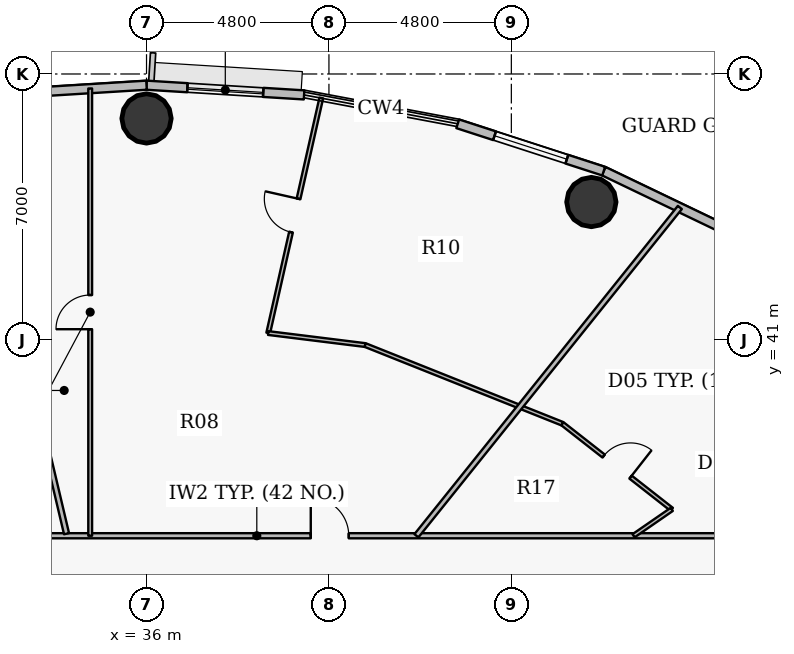
"""IFC4 building model, lengths in metres.
Left out: names, types, materials, properties, quantities, classifications, styles, units other than length and angle.
Written with IfcOpenShell. Run it as: python <this file> out.ifc"""

import sys

from ifc_helpers import new_model, si_unit, direction, frame, frame_2d, origin, origin_2d, place, context, subcontext, project, spatial, rectangle, hollow_circle, extrude, source, transform, mapped, element, fill, save


model = new_model("IFC4")
c1 = context("Model", 3, precision=1e-05, world=origin(), true_north=direction((0.0, 1.0)))
c2 = subcontext(c1, "Body", "Model", "MODEL_VIEW")
j1 = project(units=[si_unit("LENGTHUNIT", "METRE"), si_unit("PLANEANGLEUNIT", "RADIAN")], contexts=[c1])
p1 = place(None, origin())
s1 = spatial("IfcSite", under=j1, at=p1, CompositionType="ELEMENT")
p2 = place(p1, origin())
s2 = spatial("IfcBuilding", under=s1, at=p2, CompositionType="ELEMENT")
p3 = place(p2, frame((0.0, 0.0, 163.65)))
s3 = spatial("IfcBuildingStorey", under=s2, at=p3, CompositionType="ELEMENT", Elevation=163.65)
for number, where, z_axis, x_axis in (
    (1, (47.706, 44.631, 0.0), (0.0, 0.0, 1.0), (1.0, 0.0, 0.0)),
    (2, (36.0, 46.83, 0.0), (0.0, 0.0, 1.0), (1.0, 0.0, 0.0)),
):
    element("IfcColumn", number, at=place(p3, frame(where, z_axis=z_axis, x_axis=x_axis)), inside=s3, PredefinedType="COLUMN", context=c2, shape_type="SweptSolid", body=[
        extrude(hollow_circle(Radius=0.65, WallThickness=0.04, at=origin_2d()), origin(), (0.0, 0.0, 1.0), 3.75),
    ])
p4 = place(p3, frame((48.03, 45.444, 0.0), z_axis=(0.0, 0.0, 1.0), x_axis=(0.901564733809, -0.432644231155, 0.0)))
e3 = element("IfcWall", 3, at=p4, inside=s3, PredefinedType="SOLIDWALL", context=c2, shape_type="SweptSolid", body=[
    extrude(rectangle(XDim=3.93, YDim=0.24, at=frame_2d((1.965, 0.0))), origin(), (0.0, 0.0, 1.0), 3.5),
])
p5 = place(p3, frame((44.189, 46.689, 0.0), z_axis=(0.0, 0.0, 1.0), x_axis=(0.951209870236, -0.30854462038, 0.0)))
e4 = element("IfcWall", 4, at=p5, inside=s3, PredefinedType="SOLIDWALL", context=c2, shape_type="SweptSolid", body=[
    extrude(rectangle(XDim=4.038, YDim=0.24, at=frame_2d((2.019, 0.0))), origin(), (0.0, 0.0, 1.0), 3.5),
])
p6 = place(p5, frame((1.019, 0.0, 0.9)))
e5 = element("IfcOpeningElement", 5, at=p6, cuts=e4, PredefinedType="OPENING", context=c2, shape_type="SweptSolid", body=[
    extrude(rectangle(XDim=2.0, YDim=1.75, at=origin_2d()), frame((1.0, 0.13, 0.875), z_axis=(0.0, -1.0, 0.0), x_axis=(1.0, 0.0, 0.0)), (0.0, 0.0, 1.0), 0.26),
])
p7 = place(p3, frame((36.0, 47.705, 0.0), z_axis=(0.0, 0.0, 1.0), x_axis=(0.998104600619, -0.061540281305, 0.0)))
e6 = element("IfcWall", 6, at=p7, inside=s3, PredefinedType="SOLIDWALL", context=c2, shape_type="SweptSolid", body=[
    extrude(rectangle(XDim=4.154, YDim=0.24, at=frame_2d((2.077, 0.0))), origin(), (0.0, 0.0, 1.0), 3.5),
])
p8 = place(p7, frame((1.077, 0.0, 0.9)))
e7 = element("IfcOpeningElement", 7, at=p8, cuts=e6, PredefinedType="OPENING", context=c2, shape_type="SweptSolid", body=[
    extrude(rectangle(XDim=2.0, YDim=1.75, at=origin_2d()), frame((1.0, 0.13, 0.875), z_axis=(0.0, -1.0, 0.0), x_axis=(1.0, 0.0, 0.0)), (0.0, 0.0, 1.0), 0.26),
])
p9 = place(p3, frame((31.854, 47.449, 0.0), z_axis=(0.0, 0.0, 1.0), x_axis=(0.998104600619, 0.061540281305, 0.0)))
e8 = element("IfcWall", 8, at=p9, inside=s3, PredefinedType="SOLIDWALL", context=c2, shape_type="SweptSolid", body=[
    extrude(rectangle(XDim=4.154, YDim=0.24, at=frame_2d((2.077, 0.0))), origin(), (0.0, 0.0, 1.0), 3.5),
])
p10 = place(p3, frame((24.35, 35.85, 0.0), z_axis=(0.0, 0.0, 1.0), x_axis=(1.0, 0.0, 0.0)))
e9 = element("IfcWall", 9, at=p10, inside=s3, PredefinedType="PARTITIONING", context=c2, shape_type="SweptSolid", body=[
    extrude(rectangle(XDim=29.104, YDim=0.135, at=frame_2d((14.552, 0.0))), origin(), (0.0, 0.0, 1.0), 2.935),
])
p11 = place(p10, frame((15.972, 0.0, 0.0)))
e10 = element("IfcOpeningElement", 10, at=p11, cuts=e9, PredefinedType="OPENING", context=c2, shape_type="SweptSolid", body=[
    extrude(rectangle(XDim=1.0, YDim=2.15, at=origin_2d()), frame((0.5, 0.078, 1.075), z_axis=(0.0, -1.0, 0.0), x_axis=(1.0, 0.0, 0.0)), (0.0, 0.0, 1.0), 0.155),
])
p12 = place(p10, frame((4.074, 0.0, 0.0)))
e11 = element("IfcOpeningElement", 11, at=p12, cuts=e9, PredefinedType="OPENING", context=c2, shape_type="SweptSolid", body=[
    extrude(rectangle(XDim=1.0, YDim=2.15, at=origin_2d()), frame((0.5, 0.078, 1.075), z_axis=(0.0, -1.0, 0.0), x_axis=(1.0, 0.0, 0.0)), (0.0, 0.0, 1.0), 0.155),
])
p13 = place(p3, frame((32.976, 39.792, 0.0), z_axis=(0.0, 0.0, 1.0), x_axis=(0.230050705958, -0.973178643769, 0.0)))
e12 = element("IfcWall", 12, at=p13, inside=s3, PredefinedType="PARTITIONING", context=c2, shape_type="SweptSolid", body=[
    extrude(rectangle(XDim=3.996, YDim=0.135, at=frame_2d((1.998, 0.0))), origin(), (0.0, 0.0, 1.0), 3.5),
])
p14 = place(p3, frame((34.518, 35.85, 0.0), z_axis=(0.0, 0.0, 1.0), x_axis=(0.0, 1.0, 0.0)))
e13 = element("IfcWall", 13, at=p14, inside=s3, PredefinedType="PARTITIONING", context=c2, shape_type="SweptSolid", body=[
    extrude(rectangle(XDim=11.769, YDim=0.1, at=frame_2d((5.884, 0.0))), origin(), (0.0, 0.0, 1.0), 2.935),
])
p15 = place(p14, frame((5.434, 0.0, 0.0)))
e14 = element("IfcOpeningElement", 14, at=p15, cuts=e13, PredefinedType="OPENING", context=c2, shape_type="SweptSolid", body=[
    extrude(rectangle(XDim=0.9, YDim=2.1, at=origin_2d()), frame((0.45, 0.06, 1.05), z_axis=(0.0, -1.0, 0.0), x_axis=(1.0, 0.0, 0.0)), (0.0, 0.0, 1.0), 0.12),
])
p16 = place(p3, frame((39.202, 41.184, 0.0), z_axis=(0.0, 0.0, 1.0), x_axis=(0.220223056883, 0.975449540067, 0.0)))
e15 = element("IfcWall", 15, at=p16, inside=s3, PredefinedType="PARTITIONING", context=c2, shape_type="SweptSolid", body=[
    extrude(rectangle(XDim=6.341, YDim=0.1, at=frame_2d((3.171, 0.0))), origin(), (0.0, 0.0, 1.0), 2.935),
])
p17 = place(p16, frame((2.721, 0.0, 0.0)))
e16 = element("IfcOpeningElement", 16, at=p17, cuts=e15, PredefinedType="OPENING", context=c2, shape_type="SweptSolid", body=[
    extrude(rectangle(XDim=0.9, YDim=2.1, at=origin_2d()), frame((0.45, 0.06, 1.05), z_axis=(0.0, -1.0, 0.0), x_axis=(1.0, 0.0, 0.0)), (0.0, 0.0, 1.0), 0.12),
])
p18 = place(p3, frame((39.202, 41.184, 0.0), z_axis=(0.0, 0.0, 1.0), x_axis=(0.992398655735, -0.123064650065, 0.0)))
e17 = element("IfcWall", 17, at=p18, inside=s3, PredefinedType="PARTITIONING", context=c2, shape_type="SweptSolid", body=[
    extrude(rectangle(XDim=2.571, YDim=0.1, at=frame_2d((1.286, 0.0))), origin(), (0.0, 0.0, 1.0), 3.5),
])
p19 = place(p3, frame((41.754, 40.867, 0.0), z_axis=(0.0, 0.0, 1.0), x_axis=(0.928789673623, -0.370607261359, 0.0)))
e18 = element("IfcWall", 18, at=p19, inside=s3, PredefinedType="PARTITIONING", context=c2, shape_type="SweptSolid", body=[
    extrude(rectangle(XDim=5.589, YDim=0.1, at=frame_2d((2.794, 0.0))), origin(), (0.0, 0.0, 1.0), 2.935),
])
p20 = place(p3, frame((43.102, 35.85, 0.0), z_axis=(0.0, 0.0, 1.0), x_axis=(0.62588794771, 0.779912993168, 0.0)))
e19 = element("IfcWall", 19, at=p20, inside=s3, PredefinedType="PARTITIONING", context=c2, shape_type="SweptSolid", body=[
    extrude(rectangle(XDim=11.075, YDim=0.135, at=frame_2d((5.538, 0.0))), origin(), (0.0, 0.0, 1.0), 2.935),
])
p21 = place(p3, frame((46.71, 30.48, 0.0), z_axis=(0.0, 0.0, 1.0), x_axis=(0.951054665008, 0.309022691992, 0.0)))
e20 = element("IfcWall", 20, at=p21, inside=s3, PredefinedType="PARTITIONING", context=c2, shape_type="SweptSolid", body=[
    extrude(rectangle(XDim=14.372, YDim=0.135, at=frame_2d((7.186, 0.0))), origin(), (0.0, 0.0, 1.0), 2.935),
])
p22 = place(p3, frame((46.945, 38.796, 0.0), z_axis=(0.0, 0.0, 1.0), x_axis=(0.787307530322, -0.616560502058, 0.0)))
e21 = element("IfcWall", 21, at=p22, inside=s3, PredefinedType="PARTITIONING", context=c2, shape_type="SweptSolid", body=[
    extrude(rectangle(XDim=3.653, YDim=0.1, at=frame_2d((1.827, 0.0))), origin(), (0.0, 0.0, 1.0), 2.935),
])
p23 = place(p22, frame((1.377, 0.0, 0.0)))
e22 = element("IfcOpeningElement", 22, at=p23, cuts=e21, PredefinedType="OPENING", context=c2, shape_type="SweptSolid", body=[
    extrude(rectangle(XDim=0.9, YDim=2.1, at=origin_2d()), frame((0.45, 0.06, 1.05), z_axis=(0.0, -1.0, 0.0), x_axis=(1.0, 0.0, 0.0)), (0.0, 0.0, 1.0), 0.12),
])
p24 = place(p3, frame((48.816, 35.85, 0.0), z_axis=(0.0, 0.0, 1.0), x_axis=(0.822832340307, 0.568284206841, 0.0)))
e23 = element("IfcWall", 23, at=p24, inside=s3, PredefinedType="PARTITIONING", context=c2, shape_type="SweptSolid", body=[
    extrude(rectangle(XDim=1.221, YDim=0.1, at=frame_2d((0.61, 0.0))), origin(), (0.0, 0.0, 1.0), 3.5),
])
m1 = source(origin(), c2, "Body", "SweptSolid", [
    extrude(rectangle(XDim=2.0, YDim=1.75, at=origin_2d()), frame((1.0, 0.03, 0.875), z_axis=(0.0, -1.0, 0.0), x_axis=(1.0, 0.0, 0.0)), (0.0, 0.0, 1.0), 0.06),
])
p25 = place(p6, origin())
e24 = element("IfcWindow", 24, at=p25, inside=s3, PartitioningType="DOUBLE_PANEL_VERTICAL", PredefinedType="WINDOW", context=c2, shape_type="MappedRepresentation", body=[
    mapped(m1, transform((0.0, 0.0, 0.0), x_axis=(1.0, 0.0, 0.0), y_axis=(0.0, 1.0, 0.0), z_axis=(0.0, 0.0, 1.0), scale=1.0)),
])
fill(e5, e24)
p26 = place(p8, origin())
e25 = element("IfcWindow", 25, at=p26, inside=s3, PartitioningType="DOUBLE_PANEL_VERTICAL", PredefinedType="WINDOW", context=c2, shape_type="MappedRepresentation", body=[
    mapped(m1, transform((0.0, 0.0, 0.0), x_axis=(1.0, 0.0, 0.0), y_axis=(0.0, 1.0, 0.0), z_axis=(0.0, 0.0, 1.0), scale=1.0)),
])
fill(e7, e25)
m2 = source(origin(), c2, "Body", "SweptSolid", [
    extrude(rectangle(XDim=0.9, YDim=2.1, at=origin_2d()), frame((0.45, 0.025, 1.05), z_axis=(0.0, -1.0, 0.0), x_axis=(1.0, 0.0, 0.0)), (0.0, 0.0, 1.0), 0.05),
])
p27 = place(p23, origin())
e26 = element("IfcDoor", 26, at=p27, inside=s3, OperationType="SINGLE_SWING_RIGHT", PredefinedType="DOOR", context=c2, shape_type="MappedRepresentation", body=[
    mapped(m2, transform((0.0, 0.0, 0.0), x_axis=(1.0, 0.0, 0.0), y_axis=(0.0, 1.0, 0.0), z_axis=(0.0, 0.0, 1.0), scale=1.0)),
])
fill(e22, e26)
m3 = source(origin(), c2, "Body", "SweptSolid", [
    extrude(rectangle(XDim=1.0, YDim=2.15, at=origin_2d()), frame((0.5, 0.025, 1.075), z_axis=(0.0, -1.0, 0.0), x_axis=(1.0, 0.0, 0.0)), (0.0, 0.0, 1.0), 0.05),
])
p28 = place(p11, origin())
e27 = element("IfcDoor", 27, at=p28, inside=s3, OperationType="SINGLE_SWING_LEFT", PredefinedType="DOOR", context=c2, shape_type="MappedRepresentation", body=[
    mapped(m3, transform((0.0, 0.0, 0.0), x_axis=(1.0, 0.0, 0.0), y_axis=(0.0, 1.0, 0.0), z_axis=(0.0, 0.0, 1.0), scale=1.0)),
])
fill(e10, e27)
p29 = place(p17, origin())
e28 = element("IfcDoor", 28, at=p29, inside=s3, OperationType="SINGLE_SWING_RIGHT", PredefinedType="DOOR", context=c2, shape_type="MappedRepresentation", body=[
    mapped(m2, transform((0.0, 0.0, 0.0), x_axis=(1.0, 0.0, 0.0), y_axis=(0.0, 1.0, 0.0), z_axis=(0.0, 0.0, 1.0), scale=1.0)),
])
fill(e16, e28)
p30 = place(p15, origin())
e29 = element("IfcDoor", 29, at=p30, inside=s3, OperationType="SINGLE_SWING_LEFT", PredefinedType="DOOR", context=c2, shape_type="MappedRepresentation", body=[
    mapped(m2, transform((0.0, 0.0, 0.0), x_axis=(1.0, 0.0, 0.0), y_axis=(0.0, 1.0, 0.0), z_axis=(0.0, 0.0, 1.0), scale=1.0)),
])
fill(e14, e29)
save(model, sys.argv[1])
